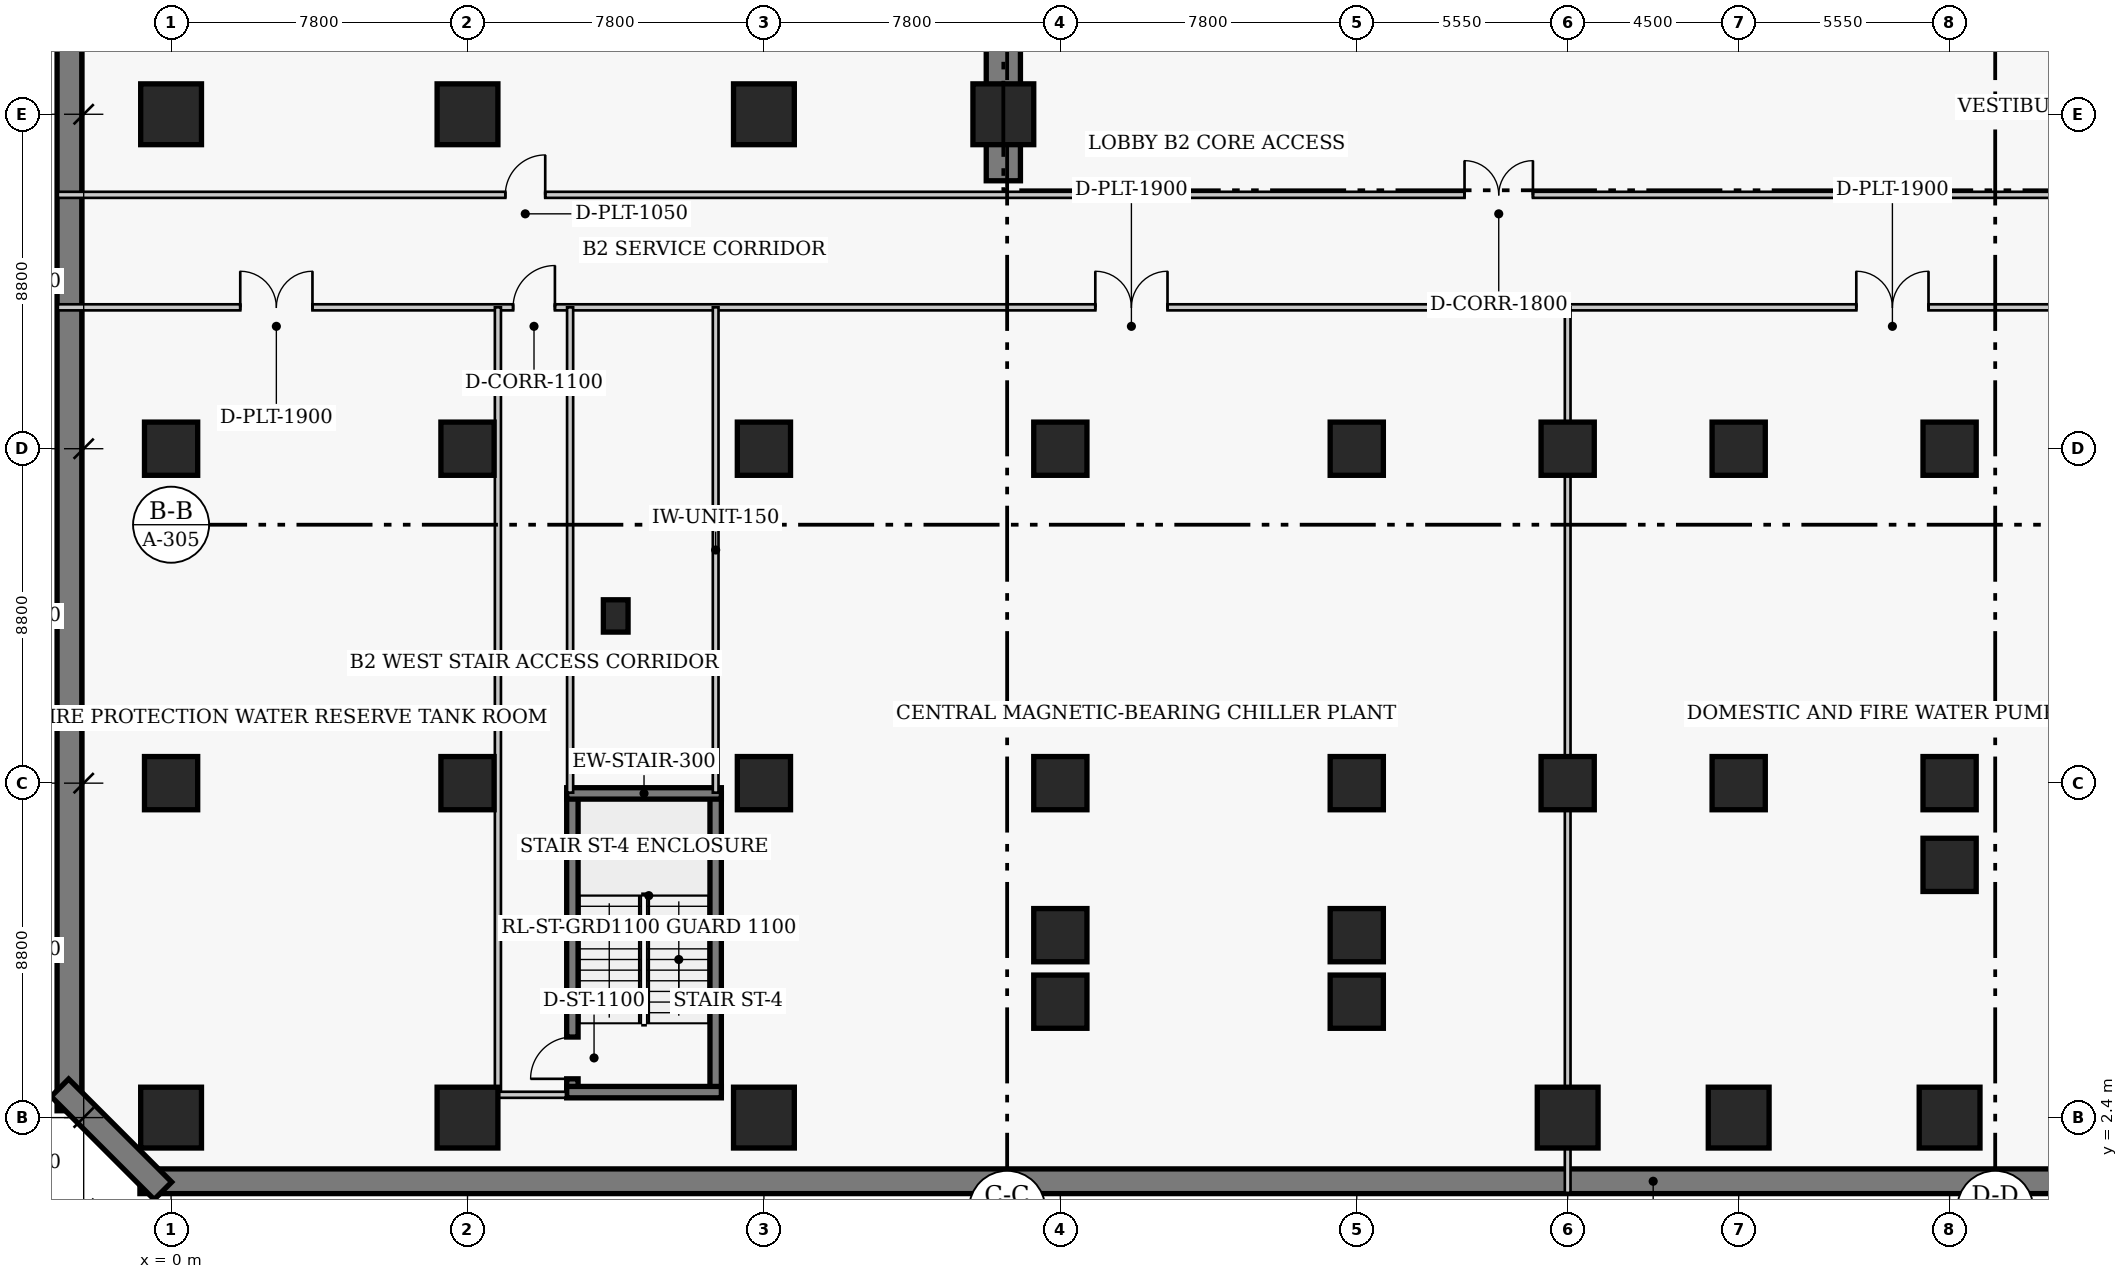
"""IFC4 building model, lengths in metres.
Left out: names, types, materials, properties, quantities, classifications, styles, units other than length and angle.
Written with IfcOpenShell. Run it as: python <this file> out.ifc"""

import sys

from ifc_helpers import new_model, si_unit, direction, frame, frame_2d, origin, origin_2d, place, context, subcontext, project, spatial, rectangle, extrude, element, fill, save


model = new_model("IFC4")
c1 = context("Model", 3, precision=1e-05, world=origin(), true_north=direction((0.0, 1.0)))
c2 = subcontext(c1, "Body", "Model", "MODEL_VIEW")
j1 = project(units=[si_unit("LENGTHUNIT", "METRE"), si_unit("PLANEANGLEUNIT", "RADIAN")], contexts=[c1])
p1 = place(None, origin())
s1 = spatial("IfcSite", under=j1, at=p1, CompositionType="ELEMENT")
p2 = place(p1, origin())
s2 = spatial("IfcBuilding", under=s1, at=p2, CompositionType="ELEMENT")
p3 = place(p2, frame((0.0, 0.0, -9.0)))
s3 = spatial("IfcBuildingStorey", under=s2, at=p3, CompositionType="ELEMENT", Elevation=-9.0)
p4 = place(p3, frame((-0.82, 0.725, 0.0), z_axis=(0.0, 0.0, 1.0), x_axis=(1.0, 0.0, 0.0)))
e1 = element("IfcWall", 1, at=p4, inside=s3, PredefinedType="USERDEFINED", context=c2, shape_type="SweptSolid", body=[
    extrude(rectangle(XDim=79.64, YDim=0.65, at=frame_2d((39.82, 0.0))), origin(), (0.0, 0.0, 1.0), 4.18),
])
p5 = place(p3, frame((-2.675, 49.42, 0.0), z_axis=(0.0, 0.0, 1.0), x_axis=(0.0, -1.0, 0.0)))
e2 = element("IfcWall", 2, at=p5, inside=s3, PredefinedType="USERDEFINED", context=c2, shape_type="SweptSolid", body=[
    extrude(rectangle(XDim=46.84, YDim=0.65, at=frame_2d((23.42, 0.0))), origin(), (0.0, 0.0, 1.0), 4.18),
])
p6 = place(p3, frame((-2.926, 3.185, 0.0), z_axis=(0.0, 0.0, 1.0), x_axis=(0.707106781187, -0.707106781187, 0.0)))
e3 = element("IfcWall", 3, at=p6, inside=s3, PredefinedType="USERDEFINED", context=c2, shape_type="SweptSolid", body=[
    extrude(rectangle(XDim=3.834, YDim=0.65, at=frame_2d((1.917, 0.0))), origin(), (0.0, 0.0, 1.0), 4.18),
])
p7 = place(p3, frame((21.9, 27.05, 0.0), z_axis=(0.0, 0.0, 1.0), x_axis=(0.0, 1.0, 0.0)))
e4 = element("IfcWall", 4, at=p7, inside=s3, PredefinedType="SHEAR", context=c2, shape_type="SweptSolid", body=[
    extrude(rectangle(XDim=13.72, YDim=0.9, at=frame_2d((6.86, 0.0))), origin(), (0.0, 0.0, 1.0), 4.5),
])
p8 = place(p3, frame((10.56, 3.07, 0.0), z_axis=(0.0, 0.0, 1.0), x_axis=(0.0, 1.0, 0.0)))
e5 = element("IfcWall", 5, at=p8, inside=s3, PredefinedType="SHEAR", context=c2, shape_type="SweptSolid", body=[
    extrude(rectangle(XDim=7.86, YDim=0.3, at=frame_2d((3.93, 0.0))), origin(), (0.0, 0.0, 1.0), 4.5),
])
p9 = place(p8, frame((0.35, 0.0, 0.0)))
e6 = element("IfcOpeningElement", 6, at=p9, cuts=e5, PredefinedType="OPENING", context=c2, shape_type="SweptSolid", body=[
    extrude(rectangle(XDim=1.1, YDim=2.15, at=frame_2d((0.55, 1.075))), frame((0.0, 0.16, 0.0), z_axis=(0.0, -1.0, 0.0), x_axis=(1.0, 0.0, 0.0)), (0.0, 0.0, 1.0), 0.32),
])
p10 = place(p3, frame((14.33, 3.07, 0.0), z_axis=(0.0, 0.0, 1.0), x_axis=(0.0, 1.0, 0.0)))
e7 = element("IfcWall", 7, at=p10, inside=s3, PredefinedType="SHEAR", context=c2, shape_type="SweptSolid", body=[
    extrude(rectangle(XDim=7.86, YDim=0.3, at=frame_2d((3.93, 0.0))), origin(), (0.0, 0.0, 1.0), 4.5),
])
for number, where, z_axis, x_axis in (
    (8, (10.41, 10.93, 0.0), (0.0, 0.0, 1.0), (1.0, 0.0, 0.0)),
    (9, (10.41, 3.07, 0.0), (0.0, 0.0, 1.0), (1.0, 0.0, 0.0)),
):
    element("IfcWall", number, at=place(p3, frame(where, z_axis=z_axis, x_axis=x_axis)), inside=s3, PredefinedType="SHEAR", context=c2, shape_type="SweptSolid", body=[
        extrude(rectangle(XDim=4.07, YDim=0.3, at=frame_2d((2.035, 0.0))), origin(), (0.0, 0.0, 1.0), 4.5),
    ])
p11 = place(p3, frame((0.0, 2.4, 0.0), z_axis=(0.0, 0.0, 1.0), x_axis=(1.0, 0.0, 0.0)))
e10 = element("IfcColumn", 10, at=p11, inside=s3, PredefinedType="COLUMN", context=c2, shape_type="SweptSolid", body=[
    extrude(rectangle(XDim=1.6, YDim=1.6, at=origin_2d()), origin(), (0.0, 0.0, 1.0), 4.5),
])
for number, where, z_axis, x_axis in (
    (11, (0.0, 11.2, 0.0), (0.0, 0.0, 1.0), (1.0, 0.0, 0.0)),
    (12, (0.0, 20.0, 0.0), (0.0, 0.0, 1.0), (1.0, 0.0, 0.0)),
):
    element("IfcColumn", number, at=place(p3, frame(where, z_axis=z_axis, x_axis=x_axis)), inside=s3, PredefinedType="COLUMN", context=c2, shape_type="SweptSolid", body=[
        extrude(rectangle(XDim=1.4, YDim=1.4, at=origin_2d()), origin(), (0.0, 0.0, 1.0), 4.5),
    ])
for number, where, z_axis, x_axis in (
    (13, (0.0, 28.8, 0.0), (0.0, 0.0, 1.0), (1.0, 0.0, 0.0)),
    (14, (7.8, 2.4, 0.0), (0.0, 0.0, 1.0), (1.0, 0.0, 0.0)),
):
    element("IfcColumn", number, at=place(p3, frame(where, z_axis=z_axis, x_axis=x_axis)), inside=s3, PredefinedType="COLUMN", context=c2, shape_type="SweptSolid", body=[
        extrude(rectangle(XDim=1.6, YDim=1.6, at=origin_2d()), origin(), (0.0, 0.0, 1.0), 4.5),
    ])
for number, where, z_axis, x_axis in (
    (15, (7.8, 11.2, 0.0), (0.0, 0.0, 1.0), (1.0, 0.0, 0.0)),
    (16, (7.8, 20.0, 0.0), (0.0, 0.0, 1.0), (1.0, 0.0, 0.0)),
):
    element("IfcColumn", number, at=place(p3, frame(where, z_axis=z_axis, x_axis=x_axis)), inside=s3, PredefinedType="COLUMN", context=c2, shape_type="SweptSolid", body=[
        extrude(rectangle(XDim=1.4, YDim=1.4, at=origin_2d()), origin(), (0.0, 0.0, 1.0), 4.5),
    ])
for number, where, z_axis, x_axis in (
    (17, (7.8, 28.8, 0.0), (0.0, 0.0, 1.0), (1.0, 0.0, 0.0)),
    (18, (15.6, 2.4, 0.0), (0.0, 0.0, 1.0), (1.0, 0.0, 0.0)),
):
    element("IfcColumn", number, at=place(p3, frame(where, z_axis=z_axis, x_axis=x_axis)), inside=s3, PredefinedType="COLUMN", context=c2, shape_type="SweptSolid", body=[
        extrude(rectangle(XDim=1.6, YDim=1.6, at=origin_2d()), origin(), (0.0, 0.0, 1.0), 4.5),
    ])
for number, where, z_axis, x_axis in (
    (19, (15.6, 11.2, 0.0), (0.0, 0.0, 1.0), (1.0, 0.0, 0.0)),
    (20, (15.6, 20.0, 0.0), (0.0, 0.0, 1.0), (1.0, 0.0, 0.0)),
):
    element("IfcColumn", number, at=place(p3, frame(where, z_axis=z_axis, x_axis=x_axis)), inside=s3, PredefinedType="COLUMN", context=c2, shape_type="SweptSolid", body=[
        extrude(rectangle(XDim=1.4, YDim=1.4, at=origin_2d()), origin(), (0.0, 0.0, 1.0), 4.5),
    ])
p12 = place(p3, frame((15.6, 28.8, 0.0), z_axis=(0.0, 0.0, 1.0), x_axis=(1.0, 0.0, 0.0)))
e21 = element("IfcColumn", 21, at=p12, inside=s3, PredefinedType="COLUMN", context=c2, shape_type="SweptSolid", body=[
    extrude(rectangle(XDim=1.6, YDim=1.6, at=origin_2d()), origin(), (0.0, 0.0, 1.0), 4.5),
])
for number, where, z_axis, x_axis in (
    (22, (23.4, 11.2, 0.0), (0.0, 0.0, 1.0), (1.0, 0.0, 0.0)),
    (23, (23.4, 20.0, 0.0), (0.0, 0.0, 1.0), (1.0, 0.0, 0.0)),
    (24, (31.2, 11.2, 0.0), (0.0, 0.0, 1.0), (1.0, 0.0, 0.0)),
    (25, (31.2, 20.0, 0.0), (0.0, 0.0, 1.0), (1.0, 0.0, 0.0)),
):
    element("IfcColumn", number, at=place(p3, frame(where, z_axis=z_axis, x_axis=x_axis)), inside=s3, PredefinedType="COLUMN", context=c2, shape_type="SweptSolid", body=[
        extrude(rectangle(XDim=1.4, YDim=1.4, at=origin_2d()), origin(), (0.0, 0.0, 1.0), 4.5),
    ])
p13 = place(p3, frame((36.75, 2.4, 0.0), z_axis=(0.0, 0.0, 1.0), x_axis=(1.0, 0.0, 0.0)))
e26 = element("IfcColumn", 26, at=p13, inside=s3, PredefinedType="COLUMN", context=c2, shape_type="SweptSolid", body=[
    extrude(rectangle(XDim=1.6, YDim=1.6, at=origin_2d()), origin(), (0.0, 0.0, 1.0), 4.5),
])
for number, where, z_axis, x_axis in (
    (27, (36.75, 11.2, 0.0), (0.0, 0.0, 1.0), (1.0, 0.0, 0.0)),
    (28, (36.75, 20.0, 0.0), (0.0, 0.0, 1.0), (1.0, 0.0, 0.0)),
):
    element("IfcColumn", number, at=place(p3, frame(where, z_axis=z_axis, x_axis=x_axis)), inside=s3, PredefinedType="COLUMN", context=c2, shape_type="SweptSolid", body=[
        extrude(rectangle(XDim=1.4, YDim=1.4, at=origin_2d()), origin(), (0.0, 0.0, 1.0), 4.5),
    ])
p14 = place(p3, frame((41.25, 2.4, 0.0), z_axis=(0.0, 0.0, 1.0), x_axis=(1.0, 0.0, 0.0)))
e29 = element("IfcColumn", 29, at=p14, inside=s3, PredefinedType="COLUMN", context=c2, shape_type="SweptSolid", body=[
    extrude(rectangle(XDim=1.6, YDim=1.6, at=origin_2d()), origin(), (0.0, 0.0, 1.0), 4.5),
])
for number, where, z_axis, x_axis in (
    (30, (41.25, 11.2, 0.0), (0.0, 0.0, 1.0), (1.0, 0.0, 0.0)),
    (31, (41.25, 20.0, 0.0), (0.0, 0.0, 1.0), (1.0, 0.0, 0.0)),
):
    element("IfcColumn", number, at=place(p3, frame(where, z_axis=z_axis, x_axis=x_axis)), inside=s3, PredefinedType="COLUMN", context=c2, shape_type="SweptSolid", body=[
        extrude(rectangle(XDim=1.4, YDim=1.4, at=origin_2d()), origin(), (0.0, 0.0, 1.0), 4.5),
    ])
p15 = place(p3, frame((46.8, 2.4, 0.0), z_axis=(0.0, 0.0, 1.0), x_axis=(1.0, 0.0, 0.0)))
e32 = element("IfcColumn", 32, at=p15, inside=s3, PredefinedType="COLUMN", context=c2, shape_type="SweptSolid", body=[
    extrude(rectangle(XDim=1.6, YDim=1.6, at=origin_2d()), origin(), (0.0, 0.0, 1.0), 4.5),
])
for number, where, z_axis, x_axis in (
    (33, (46.8, 11.2, 0.0), (0.0, 0.0, 1.0), (1.0, 0.0, 0.0)),
    (34, (46.8, 20.0, 0.0), (0.0, 0.0, 1.0), (1.0, 0.0, 0.0)),
):
    element("IfcColumn", number, at=place(p3, frame(where, z_axis=z_axis, x_axis=x_axis)), inside=s3, PredefinedType="COLUMN", context=c2, shape_type="SweptSolid", body=[
        extrude(rectangle(XDim=1.4, YDim=1.4, at=origin_2d()), origin(), (0.0, 0.0, 1.0), 4.5),
    ])
p16 = place(p3, frame((21.9, 28.8, 0.0), z_axis=(0.0, 0.0, 1.0), x_axis=(1.0, 0.0, 0.0)))
e35 = element("IfcColumn", 35, at=p16, inside=s3, PredefinedType="COLUMN", context=c2, shape_type="SweptSolid", body=[
    extrude(rectangle(XDim=1.6, YDim=1.6, at=origin_2d()), origin(), (0.0, 0.0, 1.0), 4.5),
])
for number, where, z_axis, x_axis in (
    (36, (23.4, 7.2, 0.0), (0.0, 0.0, 1.0), (1.0, 0.0, 0.0)),
    (37, (31.2, 7.2, 0.0), (0.0, 0.0, 1.0), (1.0, 0.0, 0.0)),
    (38, (23.4, 5.45, 0.0), (0.0, 0.0, 1.0), (1.0, 0.0, 0.0)),
    (39, (31.2, 5.45, 0.0), (0.0, 0.0, 1.0), (1.0, 0.0, 0.0)),
    (40, (46.8, 9.05, 0.0), (0.0, 0.0, 1.0), (1.0, 0.0, 0.0)),
):
    element("IfcColumn", number, at=place(p3, frame(where, z_axis=z_axis, x_axis=x_axis)), inside=s3, PredefinedType="COLUMN", context=c2, shape_type="SweptSolid", body=[
        extrude(rectangle(XDim=1.4, YDim=1.4, at=origin_2d()), origin(), (0.0, 0.0, 1.0), 4.5),
    ])
p17 = place(p3, frame((11.7, 15.6, 0.0), z_axis=(0.0, 0.0, 1.0), x_axis=(1.0, 0.0, 0.0)))
e41 = element("IfcColumn", 41, at=p17, inside=s3, PredefinedType="PILASTER", context=c2, shape_type="SweptSolid", body=[
    extrude(rectangle(XDim=0.65, YDim=0.85, at=origin_2d()), origin(), (0.0, 0.0, 1.0), 4.5),
])
p18 = place(p3, frame((-2.98, 23.72, 0.0), z_axis=(0.0, 0.0, 1.0), x_axis=(1.0, 0.0, 0.0)))
e42 = element("IfcWall", 42, at=p18, inside=s3, PredefinedType="PARTITIONING", context=c2, shape_type="SweptSolid", body=[
    extrude(rectangle(XDim=83.96, YDim=0.16, at=frame_2d((41.98, 0.0))), origin(), (0.0, 0.0, 1.0), 4.18),
])
p19 = place(p18, frame((11.98, 0.0, 0.0)))
e43 = element("IfcOpeningElement", 43, at=p19, cuts=e42, PredefinedType="OPENING", context=c2, shape_type="SweptSolid", body=[
    extrude(rectangle(XDim=1.1, YDim=2.15, at=frame_2d((0.55, 1.075))), frame((0.0, 0.09, 0.0), z_axis=(0.0, -1.0, 0.0), x_axis=(1.0, 0.0, 0.0)), (0.0, 0.0, 1.0), 0.18),
])
p20 = place(p18, frame((4.8, 0.0, 0.0)))
e44 = element("IfcOpeningElement", 44, at=p20, cuts=e42, PredefinedType="OPENING", context=c2, shape_type="SweptSolid", body=[
    extrude(rectangle(XDim=1.9, YDim=2.25, at=frame_2d((0.95, 1.125))), frame((0.0, 0.09, 0.0), z_axis=(0.0, -1.0, 0.0), x_axis=(1.0, 0.0, 0.0)), (0.0, 0.0, 1.0), 0.18),
])
p21 = place(p18, frame((27.3, 0.0, 0.0)))
e45 = element("IfcOpeningElement", 45, at=p21, cuts=e42, PredefinedType="OPENING", context=c2, shape_type="SweptSolid", body=[
    extrude(rectangle(XDim=1.9, YDim=2.25, at=frame_2d((0.95, 1.125))), frame((0.0, 0.09, 0.0), z_axis=(0.0, -1.0, 0.0), x_axis=(1.0, 0.0, 0.0)), (0.0, 0.0, 1.0), 0.18),
])
p22 = place(p18, frame((47.325, 0.0, 0.0)))
e46 = element("IfcOpeningElement", 46, at=p22, cuts=e42, PredefinedType="OPENING", context=c2, shape_type="SweptSolid", body=[
    extrude(rectangle(XDim=1.9, YDim=2.25, at=frame_2d((0.95, 1.125))), frame((0.0, 0.09, 0.0), z_axis=(0.0, -1.0, 0.0), x_axis=(1.0, 0.0, 0.0)), (0.0, 0.0, 1.0), 0.18),
])
p23 = place(p18, frame((69.05, 0.0, 0.0)))
e47 = element("IfcOpeningElement", 47, at=p23, cuts=e42, PredefinedType="OPENING", context=c2, shape_type="SweptSolid", body=[
    extrude(rectangle(XDim=1.9, YDim=2.25, at=frame_2d((0.95, 1.125))), frame((0.0, 0.09, 0.0), z_axis=(0.0, -1.0, 0.0), x_axis=(1.0, 0.0, 0.0)), (0.0, 0.0, 1.0), 0.18),
])
p24 = place(p3, frame((-2.98, 26.68, 0.0), z_axis=(0.0, 0.0, 1.0), x_axis=(1.0, 0.0, 0.0)))
e48 = element("IfcWall", 48, at=p24, inside=s3, PredefinedType="PARTITIONING", context=c2, shape_type="SweptSolid", body=[
    extrude(rectangle(XDim=83.96, YDim=0.16, at=frame_2d((41.98, 0.0))), origin(), (0.0, 0.0, 1.0), 4.18),
])
p25 = place(p24, frame((37.016, 0.0, 0.0)))
e49 = element("IfcOpeningElement", 49, at=p25, cuts=e48, PredefinedType="OPENING", context=c2, shape_type="SweptSolid", body=[
    extrude(rectangle(XDim=1.8, YDim=2.2, at=frame_2d((0.9, 1.1))), frame((0.0, 0.09, 0.0), z_axis=(0.0, -1.0, 0.0), x_axis=(1.0, 0.0, 0.0)), (0.0, 0.0, 1.0), 0.18),
])
p26 = place(p24, frame((11.775, 0.0, 0.0)))
e50 = element("IfcOpeningElement", 50, at=p26, cuts=e48, PredefinedType="OPENING", context=c2, shape_type="SweptSolid", body=[
    extrude(rectangle(XDim=1.05, YDim=2.15, at=frame_2d((0.525, 1.075))), frame((0.0, 0.09, 0.0), z_axis=(0.0, -1.0, 0.0), x_axis=(1.0, 0.0, 0.0)), (0.0, 0.0, 1.0), 0.18),
])
p27 = place(p24, frame((70.925, 0.0, 0.0)))
e51 = element("IfcOpeningElement", 51, at=p27, cuts=e48, PredefinedType="OPENING", context=c2, shape_type="SweptSolid", body=[
    extrude(rectangle(XDim=1.05, YDim=2.15, at=frame_2d((0.525, 1.075))), frame((0.0, 0.09, 0.0), z_axis=(0.0, -1.0, 0.0), x_axis=(1.0, 0.0, 0.0)), (0.0, 0.0, 1.0), 0.18),
])
p28 = place(p3, frame((8.6, 3.0, 0.0), z_axis=(0.0, 0.0, 1.0), x_axis=(0.0, 1.0, 0.0)))
e52 = element("IfcWall", 52, at=p28, inside=s3, PredefinedType="PARTITIONING", context=c2, shape_type="SweptSolid", body=[
    extrude(rectangle(XDim=20.72, YDim=0.16, at=frame_2d((10.36, 0.0))), origin(), (0.0, 0.0, 1.0), 4.18),
])
p29 = place(p3, frame((10.5, 10.95, 0.0), z_axis=(0.0, 0.0, 1.0), x_axis=(0.0, 1.0, 0.0)))
e53 = element("IfcWall", 53, at=p29, inside=s3, PredefinedType="PARTITIONING", context=c2, shape_type="SweptSolid", body=[
    extrude(rectangle(XDim=12.77, YDim=0.16, at=frame_2d((6.385, 0.0))), origin(), (0.0, 0.0, 1.0), 4.18),
])
p30 = place(p3, frame((8.6, 3.0, 0.0), z_axis=(0.0, 0.0, 1.0), x_axis=(1.0, 0.0, 0.0)))
e54 = element("IfcWall", 54, at=p30, inside=s3, PredefinedType="PARTITIONING", context=c2, shape_type="SweptSolid", body=[
    extrude(rectangle(XDim=1.79, YDim=0.16, at=frame_2d((0.895, 0.0))), origin(), (0.0, 0.0, 1.0), 4.18),
])
p31 = place(p3, frame((14.33, 10.95, 0.0), z_axis=(0.0, 0.0, 1.0), x_axis=(0.0, 1.0, 0.0)))
e55 = element("IfcWall", 55, at=p31, inside=s3, PredefinedType="PARTITIONING", context=c2, shape_type="SweptSolid", body=[
    extrude(rectangle(XDim=12.77, YDim=0.15, at=frame_2d((6.385, 0.0))), origin(), (0.0, 0.0, 1.0), 4.18),
])
p32 = place(p3, frame((36.75, 0.42, 0.0), z_axis=(0.0, 0.0, 1.0), x_axis=(0.0, 1.0, 0.0)))
e56 = element("IfcWall", 56, at=p32, inside=s3, PredefinedType="PARTITIONING", context=c2, shape_type="SweptSolid", body=[
    extrude(rectangle(XDim=23.3, YDim=0.15, at=frame_2d((11.65, 0.0))), origin(), (0.0, 0.0, 1.0), 3.14),
])
p33 = place(p25, origin())
e57 = element("IfcDoor", 57, at=p33, inside=s3, OperationType="DOUBLE_DOOR_SINGLE_SWING", PredefinedType="DOOR", context=c2, shape_type="SweptSolid", body=[
    extrude(rectangle(XDim=1.8, YDim=2.2, at=frame_2d((0.9, 1.1))), frame((0.0, 0.025, 0.0), z_axis=(0.0, -1.0, 0.0), x_axis=(1.0, 0.0, 0.0)), (0.0, 0.0, 1.0), 0.05),
])
fill(e49, e57)
p34 = place(p19, origin())
e58 = element("IfcDoor", 58, at=p34, inside=s3, OperationType="SINGLE_SWING_RIGHT", PredefinedType="DOOR", context=c2, shape_type="SweptSolid", body=[
    extrude(rectangle(XDim=1.1, YDim=2.15, at=frame_2d((0.55, 1.075))), frame((0.0, 0.025, 0.0), z_axis=(0.0, -1.0, 0.0), x_axis=(1.0, 0.0, 0.0)), (0.0, 0.0, 1.0), 0.05),
])
fill(e43, e58)
p35 = place(p20, origin())
e59 = element("IfcDoor", 59, at=p35, inside=s3, OperationType="DOUBLE_DOOR_SINGLE_SWING", PredefinedType="DOOR", context=c2, shape_type="SweptSolid", body=[
    extrude(rectangle(XDim=1.9, YDim=2.25, at=frame_2d((0.95, 1.125))), frame((0.0, 0.025, 0.0), z_axis=(0.0, -1.0, 0.0), x_axis=(1.0, 0.0, 0.0)), (0.0, 0.0, 1.0), 0.05),
])
fill(e44, e59)
p36 = place(p21, origin())
e60 = element("IfcDoor", 60, at=p36, inside=s3, OperationType="DOUBLE_DOOR_SINGLE_SWING", PredefinedType="DOOR", context=c2, shape_type="SweptSolid", body=[
    extrude(rectangle(XDim=1.9, YDim=2.25, at=frame_2d((0.95, 1.125))), frame((0.0, 0.025, 0.0), z_axis=(0.0, -1.0, 0.0), x_axis=(1.0, 0.0, 0.0)), (0.0, 0.0, 1.0), 0.05),
])
fill(e45, e60)
p37 = place(p22, origin())
e61 = element("IfcDoor", 61, at=p37, inside=s3, OperationType="DOUBLE_DOOR_SINGLE_SWING", PredefinedType="DOOR", context=c2, shape_type="SweptSolid", body=[
    extrude(rectangle(XDim=1.9, YDim=2.25, at=frame_2d((0.95, 1.125))), frame((0.0, 0.025, 0.0), z_axis=(0.0, -1.0, 0.0), x_axis=(1.0, 0.0, 0.0)), (0.0, 0.0, 1.0), 0.05),
])
fill(e46, e61)
p38 = place(p26, origin())
e62 = element("IfcDoor", 62, at=p38, inside=s3, OperationType="SINGLE_SWING_RIGHT", PredefinedType="DOOR", context=c2, shape_type="SweptSolid", body=[
    extrude(rectangle(XDim=1.05, YDim=2.15, at=frame_2d((0.525, 1.075))), frame((0.0, 0.025, 0.0), z_axis=(0.0, -1.0, 0.0), x_axis=(1.0, 0.0, 0.0)), (0.0, 0.0, 1.0), 0.05),
])
fill(e50, e62)
p39 = place(p9, origin())
e63 = element("IfcDoor", 63, at=p39, inside=s3, OperationType="SINGLE_SWING_LEFT", PredefinedType="DOOR", context=c2, shape_type="SweptSolid", body=[
    extrude(rectangle(XDim=1.1, YDim=2.15, at=frame_2d((0.55, 1.075))), frame((0.0, 0.025, 0.0), z_axis=(0.0, -1.0, 0.0), x_axis=(1.0, 0.0, 0.0)), (0.0, 0.0, 1.0), 0.05),
])
fill(e6, e63)
save(model, sys.argv[1])
